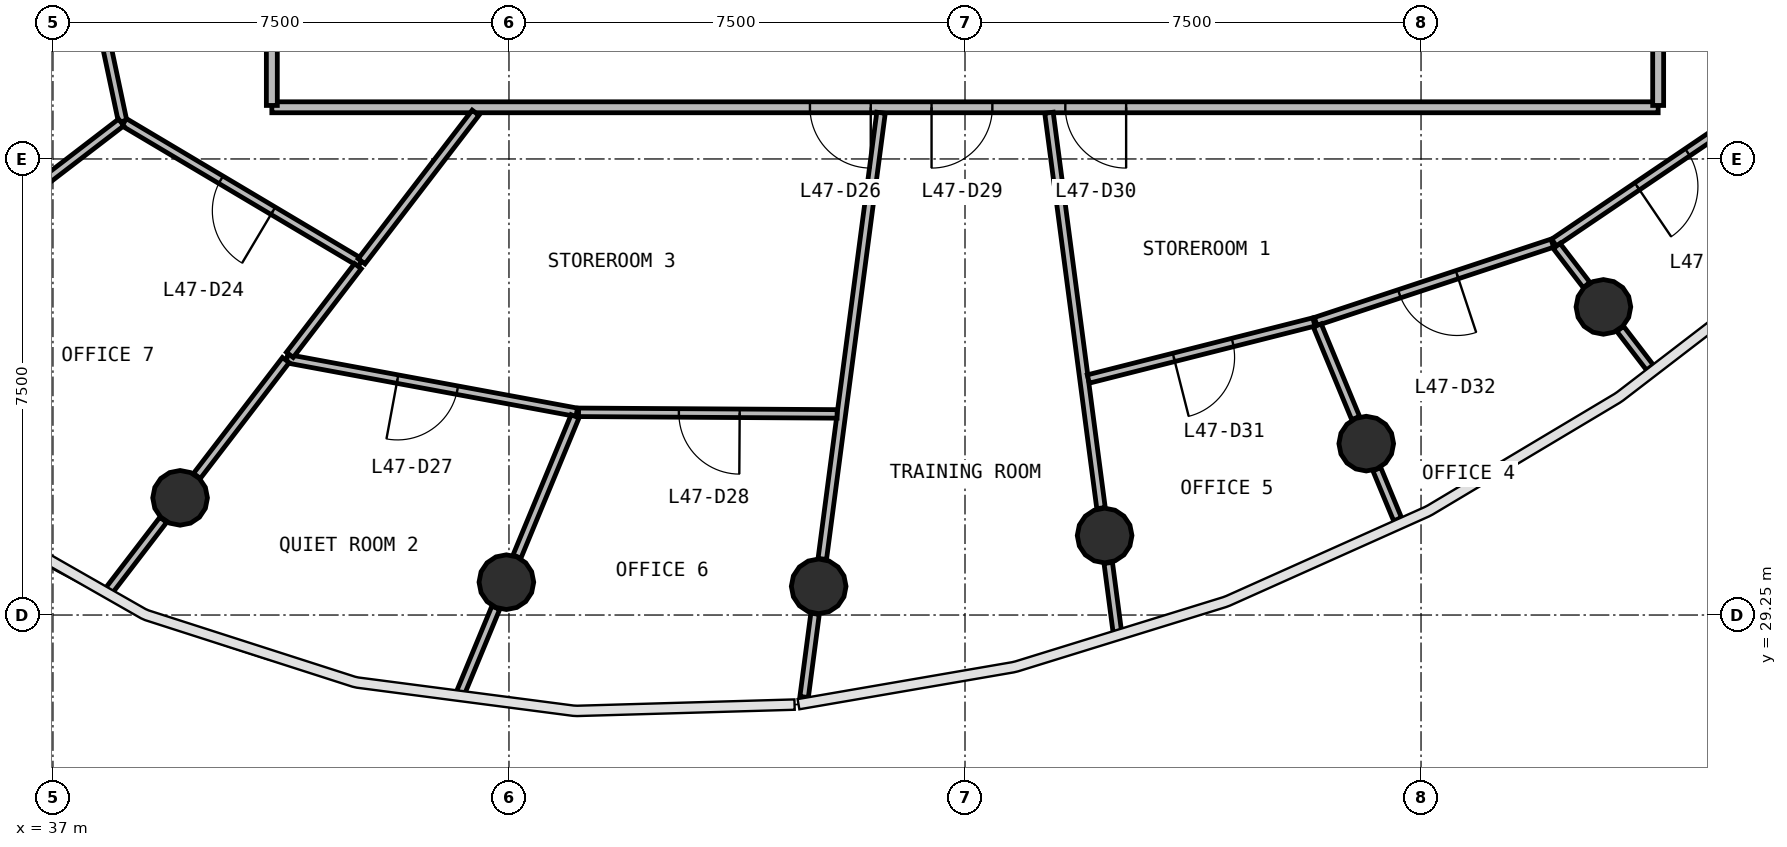
"""IFC4 building model, lengths in metres.
Left out: names, types, materials, properties, quantities, classifications, styles, units other than length and angle.
Written with IfcOpenShell. Run it as: python <this file> out.ifc"""

import sys

from ifc_helpers import new_model, si_unit, direction, frame, frame_2d, origin, origin_2d, place, context, subcontext, project, spatial, rectangle, circle, extrude, source, transform, mapped, element, fill, save


model = new_model("IFC4")
c1 = context("Model", 3, precision=1e-05, world=origin(), true_north=direction((0.0, 1.0)))
c2 = subcontext(c1, "Body", "Model", "MODEL_VIEW")
j1 = project(units=[si_unit("LENGTHUNIT", "METRE"), si_unit("PLANEANGLEUNIT", "RADIAN")], contexts=[c1])
p1 = place(None, origin())
s1 = spatial("IfcSite", under=j1, at=p1, CompositionType="ELEMENT")
p2 = place(p1, origin())
s2 = spatial("IfcBuilding", under=s1, at=p2, CompositionType="ELEMENT")
p3 = place(p2, frame((0.0, 0.0, 195.5)))
s3 = spatial("IfcBuildingStorey", under=s2, at=p3, CompositionType="ELEMENT", Elevation=195.5)
m1 = source(origin(), c2, "Body", "SweptSolid", [
    extrude(circle(Radius=0.45, at=origin_2d()), origin(), (0.0, 0.0, 1.0), 3.9),
])
for number, where, z_axis, x_axis in (
    (1, (39.091, 31.177, 0.0), (0.0, 0.0, 1.0), (1.0, 0.0, 0.0)),
    (2, (44.457, 29.79, 0.0), (0.0, 0.0, 1.0), (1.0, 0.0, 0.0)),
    (3, (49.594, 29.722, 0.0), (0.0, 0.0, 1.0), (1.0, 0.0, 0.0)),
    (4, (54.296, 30.558, 0.0), (0.0, 0.0, 1.0), (1.0, 0.0, 0.0)),
    (5, (58.599, 32.069, 0.0), (0.0, 0.0, 1.0), (1.0, 0.0, 0.0)),
    (6, (62.499, 34.317, 0.0), (0.0, 0.0, 1.0), (1.0, 0.0, 0.0)),
):
    element("IfcColumn", number, at=place(p3, frame(where, z_axis=z_axis, x_axis=x_axis)), inside=s3, PredefinedType="COLUMN", context=c2, shape_type="MappedRepresentation", body=[
        mapped(m1, transform((0.0, 0.0, 0.0), scale=1.0)),
    ])
p4 = place(p3, frame((63.4, 37.6, 0.0), z_axis=(0.0, 0.0, 1.0), x_axis=(-1.0, 0.0, 0.0)))
e7 = element("IfcWall", 7, at=p4, inside=s3, PredefinedType="PARTITIONING", context=c2, shape_type="SweptSolid", body=[
    extrude(rectangle(XDim=22.8, YDim=0.18, at=frame_2d((11.4, 0.0))), origin(), (0.0, 0.0, 1.0), 2.88),
])
p5 = place(p4, frame((12.95, 0.0, 0.0)))
e8 = element("IfcOpeningElement", 8, at=p5, cuts=e7, PredefinedType="OPENING", context=c2, shape_type="SweptSolid", body=[
    extrude(rectangle(XDim=1.0, YDim=2.1, at=frame_2d((0.5, 1.05))), frame((0.0, 0.1, 0.0), z_axis=(0.0, -1.0, 0.0), x_axis=(1.0, 0.0, 0.0)), (0.0, 0.0, 1.0), 0.2),
])
p6 = place(p4, frame((10.95, 0.0, 0.0)))
e9 = element("IfcOpeningElement", 9, at=p6, cuts=e7, PredefinedType="OPENING", context=c2, shape_type="SweptSolid", body=[
    extrude(rectangle(XDim=1.0, YDim=2.1, at=frame_2d((0.5, 1.05))), frame((0.0, 0.1, 0.0), z_axis=(0.0, -1.0, 0.0), x_axis=(1.0, 0.0, 0.0)), (0.0, 0.0, 1.0), 0.2),
])
p7 = place(p4, frame((8.75, 0.0, 0.0)))
e10 = element("IfcOpeningElement", 10, at=p7, cuts=e7, PredefinedType="OPENING", context=c2, shape_type="SweptSolid", body=[
    extrude(rectangle(XDim=1.0, YDim=2.1, at=frame_2d((0.5, 1.05))), frame((0.0, 0.1, 0.0), z_axis=(0.0, -1.0, 0.0), x_axis=(1.0, 0.0, 0.0)), (0.0, 0.0, 1.0), 0.2),
])
p8 = place(p3, frame((63.4, 58.37, 0.0), z_axis=(0.0, 0.0, 1.0), x_axis=(0.0, -1.0, 0.0)))
e11 = element("IfcWall", 11, at=p8, inside=s3, PredefinedType="PARTITIONING", context=c2, shape_type="SweptSolid", body=[
    extrude(rectangle(XDim=20.74, YDim=0.18, at=frame_2d((10.37, 0.0))), origin(), (0.0, 0.0, 1.0), 2.88),
])
p9 = place(p8, frame((9.89, 0.0, 0.0)))
e12 = element("IfcOpeningElement", 12, at=p9, cuts=e11, PredefinedType="OPENING", context=c2, shape_type="SweptSolid", body=[
    extrude(rectangle(XDim=1.0, YDim=2.1, at=frame_2d((0.5, 1.05))), frame((0.0, 0.1, 0.0), z_axis=(0.0, -1.0, 0.0), x_axis=(1.0, 0.0, 0.0)), (0.0, 0.0, 1.0), 0.2),
])
p10 = place(p3, frame((40.6, 37.63, 0.0), z_axis=(0.0, 0.0, 1.0), x_axis=(0.0, 1.0, 0.0)))
e13 = element("IfcWall", 13, at=p10, inside=s3, PredefinedType="PARTITIONING", context=c2, shape_type="SweptSolid", body=[
    extrude(rectangle(XDim=20.74, YDim=0.18, at=frame_2d((10.37, 0.0))), origin(), (0.0, 0.0, 1.0), 2.88),
])
p11 = place(p10, frame((12.19, 0.0, 0.0)))
e14 = element("IfcOpeningElement", 14, at=p11, cuts=e13, PredefinedType="OPENING", context=c2, shape_type="SweptSolid", body=[
    extrude(rectangle(XDim=0.9, YDim=2.1, at=frame_2d((0.45, 1.05))), frame((0.0, 0.1, 0.0), z_axis=(0.0, -1.0, 0.0), x_axis=(1.0, 0.0, 0.0)), (0.0, 0.0, 1.0), 0.2),
])
p12 = place(p10, frame((9.99, 0.0, 0.0)))
e15 = element("IfcOpeningElement", 15, at=p12, cuts=e13, PredefinedType="OPENING", context=c2, shape_type="SweptSolid", body=[
    extrude(rectangle(XDim=0.9, YDim=2.1, at=frame_2d((0.45, 1.05))), frame((0.0, 0.1, 0.0), z_axis=(0.0, -1.0, 0.0), x_axis=(1.0, 0.0, 0.0)), (0.0, 0.0, 1.0), 0.2),
])
p13 = place(p10, frame((7.69, 0.0, 0.0)))
e16 = element("IfcOpeningElement", 16, at=p13, cuts=e13, PredefinedType="OPENING", context=c2, shape_type="SweptSolid", body=[
    extrude(rectangle(XDim=1.0, YDim=2.1, at=frame_2d((0.5, 1.05))), frame((0.0, 0.1, 0.0), z_axis=(0.0, -1.0, 0.0), x_axis=(1.0, 0.0, 0.0)), (0.0, 0.0, 1.0), 0.2),
])
p14 = place(p10, frame((15.49, 0.0, 0.0)))
e17 = element("IfcOpeningElement", 17, at=p14, cuts=e13, PredefinedType="OPENING", context=c2, shape_type="SweptSolid", body=[
    extrude(rectangle(XDim=1.0, YDim=2.1, at=frame_2d((0.5, 1.05))), frame((0.0, 0.1, 0.0), z_axis=(0.0, -1.0, 0.0), x_axis=(1.0, 0.0, 0.0)), (0.0, 0.0, 1.0), 0.2),
])
p15 = place(p3, frame((49.653, 30.172, 0.0), z_axis=(0.0, 0.0, 1.0), x_axis=(0.130532164535, 0.991444075085, 0.0)))
e18 = element("IfcWall", 18, at=p15, inside=s3, PredefinedType="PARTITIONING", context=c2, shape_type="SweptSolid", body=[
    extrude(rectangle(XDim=7.401, YDim=0.14, at=frame_2d((3.7, 0.0))), origin(), (0.0, 0.0, 1.0), 2.88),
])
p16 = place(p3, frame((53.381, 37.51, 0.0), z_axis=(0.0, 0.0, 1.0), x_axis=(0.130519996386, -0.991445677051, 0.0)))
e19 = element("IfcWall", 19, at=p16, inside=s3, PredefinedType="PARTITIONING", context=c2, shape_type="SweptSolid", body=[
    extrude(rectangle(XDim=6.558, YDim=0.14, at=frame_2d((3.279, 0.0))), origin(), (0.0, 0.0, 1.0), 2.88),
])
p17 = place(p3, frame((45.615, 32.584, 0.0), z_axis=(0.0, 0.0, 1.0), x_axis=(-0.983287014194, 0.182062208375, 0.0)))
e20 = element("IfcWall", 20, at=p17, inside=s3, PredefinedType="PARTITIONING", context=c2, shape_type="SweptSolid", body=[
    extrude(rectangle(XDim=4.848, YDim=0.14, at=frame_2d((2.424, 0.0))), origin(), (0.0, 0.0, 1.0), 2.88),
])
p18 = place(p17, frame((1.997, 0.0, 0.0)))
e21 = element("IfcOpeningElement", 21, at=p18, cuts=e20, PredefinedType="OPENING", context=c2, shape_type="SweptSolid", body=[
    extrude(rectangle(XDim=1.0, YDim=2.1, at=frame_2d((0.5, 1.05))), frame((0.0, 0.08, 0.0), z_axis=(0.0, -1.0, 0.0), x_axis=(1.0, 0.0, 0.0)), (0.0, 0.0, 1.0), 0.16),
])
p19 = place(p3, frame((38.146, 37.369, 0.0), z_axis=(0.0, 0.0, 1.0), x_axis=(-0.207067802177, 0.978326594396, 0.0)))
e22 = element("IfcWall", 22, at=p19, inside=s3, PredefinedType="PARTITIONING", context=c2, shape_type="SweptSolid", body=[
    extrude(rectangle(XDim=4.526, YDim=0.14, at=frame_2d((2.263, 0.0))), origin(), (0.0, 0.0, 1.0), 2.88),
])
p20 = place(p19, frame((1.676, 0.0, 0.0)))
e23 = element("IfcOpeningElement", 23, at=p20, cuts=e22, PredefinedType="OPENING", context=c2, shape_type="SweptSolid", body=[
    extrude(rectangle(XDim=1.0, YDim=2.1, at=frame_2d((0.5, 1.05))), frame((0.0, 0.08, 0.0), z_axis=(0.0, -1.0, 0.0), x_axis=(1.0, 0.0, 0.0)), (0.0, 0.0, 1.0), 0.16),
])
p21 = place(p3, frame((42.058, 35.043, 0.0), z_axis=(0.0, 0.0, 1.0), x_axis=(-0.859530118144, 0.511085096635, 0.0)))
e24 = element("IfcWall", 24, at=p21, inside=s3, PredefinedType="PARTITIONING", context=c2, shape_type="SweptSolid", body=[
    extrude(rectangle(XDim=4.521, YDim=0.14, at=frame_2d((2.261, 0.0))), origin(), (0.0, 0.0, 1.0), 2.88),
])
p22 = place(p21, frame((1.671, 0.0, 0.0)))
e25 = element("IfcOpeningElement", 25, at=p22, cuts=e24, PredefinedType="OPENING", context=c2, shape_type="SweptSolid", body=[
    extrude(rectangle(XDim=1.0, YDim=2.1, at=frame_2d((0.5, 1.05))), frame((0.0, 0.08, 0.0), z_axis=(0.0, -1.0, 0.0), x_axis=(1.0, 0.0, 0.0)), (0.0, 0.0, 1.0), 0.16),
])
p23 = place(p3, frame((38.122, 37.351, 0.0), z_axis=(0.0, 0.0, 1.0), x_axis=(-0.793350839002, -0.608764688738, 0.0)))
e26 = element("IfcWall", 26, at=p23, inside=s3, PredefinedType="PARTITIONING", context=c2, shape_type="SweptSolid", body=[
    extrude(rectangle(XDim=4.492, YDim=0.14, at=frame_2d((2.246, 0.0))), origin(), (0.0, 0.0, 1.0), 2.88),
])
p24 = place(p3, frame((49.896, 32.558, 0.0), z_axis=(0.0, 0.0, 1.0), x_axis=(-0.999981480768, 0.006085895215, 0.0)))
e27 = element("IfcWall", 27, at=p24, inside=s3, PredefinedType="PARTITIONING", context=c2, shape_type="SweptSolid", body=[
    extrude(rectangle(XDim=4.252, YDim=0.14, at=frame_2d((2.126, 0.0))), origin(), (0.0, 0.0, 1.0), 2.88),
])
p25 = place(p24, frame((1.602, 0.0, 0.0)))
e28 = element("IfcOpeningElement", 28, at=p25, cuts=e27, PredefinedType="OPENING", context=c2, shape_type="SweptSolid", body=[
    extrude(rectangle(XDim=1.0, YDim=2.1, at=frame_2d((0.5, 1.05))), frame((0.0, 0.08, 0.0), z_axis=(0.0, -1.0, 0.0), x_axis=(1.0, 0.0, 0.0)), (0.0, 0.0, 1.0), 0.16),
])
p26 = place(p3, frame((65.283, 37.808, 0.0), z_axis=(0.0, 0.0, 1.0), x_axis=(-0.828127545773, -0.560539711288, 0.0)))
e29 = element("IfcWall", 29, at=p26, inside=s3, PredefinedType="PARTITIONING", context=c2, shape_type="SweptSolid", body=[
    extrude(rectangle(XDim=4.341, YDim=0.14, at=frame_2d((2.17, 0.0))), origin(), (0.0, 0.0, 1.0), 2.88),
])
p27 = place(p26, frame((1.691, 0.0, 0.0)))
e30 = element("IfcOpeningElement", 30, at=p27, cuts=e29, PredefinedType="OPENING", context=c2, shape_type="SweptSolid", body=[
    extrude(rectangle(XDim=1.0, YDim=2.1, at=frame_2d((0.5, 1.05))), frame((0.0, 0.08, 0.0), z_axis=(0.0, -1.0, 0.0), x_axis=(1.0, 0.0, 0.0)), (0.0, 0.0, 1.0), 0.16),
])
p28 = place(p3, frame((61.659, 35.365, 0.0), z_axis=(0.0, 0.0, 1.0), x_axis=(-0.949342227839, -0.314244068267, 0.0)))
e31 = element("IfcWall", 31, at=p28, inside=s3, PredefinedType="PARTITIONING", context=c2, shape_type="SweptSolid", body=[
    extrude(rectangle(XDim=4.1, YDim=0.14, at=frame_2d((2.05, 0.0))), origin(), (0.0, 0.0, 1.0), 2.88),
])
p29 = place(p28, frame((1.65, 0.0, 0.0)))
e32 = element("IfcOpeningElement", 32, at=p29, cuts=e31, PredefinedType="OPENING", context=c2, shape_type="SweptSolid", body=[
    extrude(rectangle(XDim=1.0, YDim=2.1, at=frame_2d((0.5, 1.05))), frame((0.0, 0.08, 0.0), z_axis=(0.0, -1.0, 0.0), x_axis=(1.0, 0.0, 0.0)), (0.0, 0.0, 1.0), 0.16),
])
p30 = place(p3, frame((57.738, 34.07, 0.0), z_axis=(0.0, 0.0, 1.0), x_axis=(-0.969463236933, -0.245236686152, 0.0)))
e33 = element("IfcWall", 33, at=p30, inside=s3, PredefinedType="PARTITIONING", context=c2, shape_type="SweptSolid", body=[
    extrude(rectangle(XDim=3.827, YDim=0.14, at=frame_2d((1.914, 0.0))), origin(), (0.0, 0.0, 1.0), 2.88),
])
p31 = place(p30, frame((1.377, 0.0, 0.0)))
e34 = element("IfcOpeningElement", 34, at=p31, cuts=e33, PredefinedType="OPENING", context=c2, shape_type="SweptSolid", body=[
    extrude(rectangle(XDim=1.0, YDim=2.1, at=frame_2d((0.5, 1.05))), frame((0.0, 0.08, 0.0), z_axis=(0.0, -1.0, 0.0), x_axis=(1.0, 0.0, 0.0)), (0.0, 0.0, 1.0), 0.16),
])
p32 = place(p3, frame((43.951, 37.51, 0.0), z_axis=(0.0, 0.0, 1.0), x_axis=(-0.608729433535, -0.793377890256, 0.0)))
e35 = element("IfcWall", 35, at=p32, inside=s3, PredefinedType="PARTITIONING", context=c2, shape_type="SweptSolid", body=[
    extrude(rectangle(XDim=3.079, YDim=0.14, at=frame_2d((1.54, 0.0))), origin(), (0.0, 0.0, 1.0), 2.88),
])
p33 = place(p3, frame((45.587, 32.518, 0.0), z_axis=(0.0, 0.0, 1.0), x_axis=(-0.382691448247, -0.923876212184, 0.0)))
e36 = element("IfcWall", 36, at=p33, inside=s3, PredefinedType="PARTITIONING", context=c2, shape_type="SweptSolid", body=[
    extrude(rectangle(XDim=2.497, YDim=0.14, at=frame_2d((1.249, 0.0))), origin(), (0.0, 0.0, 1.0), 2.88),
])
p34 = place(p3, frame((40.83, 33.443, 0.0), z_axis=(0.0, 0.0, 1.0), x_axis=(-0.608796464689, -0.793326455239, 0.0)))
e37 = element("IfcWall", 37, at=p34, inside=s3, PredefinedType="PARTITIONING", context=c2, shape_type="SweptSolid", body=[
    extrude(rectangle(XDim=2.401, YDim=0.14, at=frame_2d((1.201, 0.0))), origin(), (0.0, 0.0, 1.0), 2.88),
])
p35 = place(p3, frame((42.015, 34.987, 0.0), z_axis=(0.0, 0.0, 1.0), x_axis=(-0.608760473936, -0.793354073144, 0.0)))
e38 = element("IfcWall", 38, at=p35, inside=s3, PredefinedType="PARTITIONING", context=c2, shape_type="SweptSolid", body=[
    extrude(rectangle(XDim=1.838, YDim=0.14, at=frame_2d((0.919, 0.0))), origin(), (0.0, 0.0, 1.0), 2.88),
])
p36 = place(p3, frame((57.794, 34.012, 0.0), z_axis=(0.0, 0.0, 1.0), x_axis=(0.382648241093, -0.923894108428, 0.0)))
e39 = element("IfcWall", 39, at=p36, inside=s3, PredefinedType="PARTITIONING", context=c2, shape_type="SweptSolid", body=[
    extrude(rectangle(XDim=1.649, YDim=0.14, at=frame_2d((0.824, 0.0))), origin(), (0.0, 0.0, 1.0), 2.88),
])
p37 = place(p3, frame((44.283, 29.37, 0.0), z_axis=(0.0, 0.0, 1.0), x_axis=(-0.382783039517, -0.923838267587, 0.0)))
e40 = element("IfcWall", 40, at=p37, inside=s3, PredefinedType="PARTITIONING", context=c2, shape_type="SweptSolid", body=[
    extrude(rectangle(XDim=1.533, YDim=0.14, at=frame_2d((0.767, 0.0))), origin(), (0.0, 0.0, 1.0), 2.88),
])
p38 = place(p3, frame((38.814, 30.816, 0.0), z_axis=(0.0, 0.0, 1.0), x_axis=(-0.608738517345, -0.793370920504, 0.0)))
e41 = element("IfcWall", 41, at=p38, inside=s3, PredefinedType="PARTITIONING", context=c2, shape_type="SweptSolid", body=[
    extrude(rectangle(XDim=1.469, YDim=0.14, at=frame_2d((0.734, 0.0))), origin(), (0.0, 0.0, 1.0), 2.88),
])
p39 = place(p3, frame((49.534, 29.271, 0.0), z_axis=(0.0, 0.0, 1.0), x_axis=(-0.130495678972, -0.991448878041, 0.0)))
e42 = element("IfcWall", 42, at=p39, inside=s3, PredefinedType="PARTITIONING", context=c2, shape_type="SweptSolid", body=[
    extrude(rectangle(XDim=1.381, YDim=0.14, at=frame_2d((0.69, 0.0))), origin(), (0.0, 0.0, 1.0), 2.88),
])
p40 = place(p3, frame((54.356, 30.107, 0.0), z_axis=(0.0, 0.0, 1.0), x_axis=(0.130415862512, -0.99145938031, 0.0)))
e43 = element("IfcWall", 43, at=p40, inside=s3, PredefinedType="PARTITIONING", context=c2, shape_type="SweptSolid", body=[
    extrude(rectangle(XDim=1.144, YDim=0.14, at=frame_2d((0.572, 0.0))), origin(), (0.0, 0.0, 1.0), 2.88),
])
p41 = place(p3, frame((58.773, 31.648, 0.0), z_axis=(0.0, 0.0, 1.0), x_axis=(0.382609993492, -0.923909948469, 0.0)))
e44 = element("IfcWall", 44, at=p41, inside=s3, PredefinedType="PARTITIONING", context=c2, shape_type="SweptSolid", body=[
    extrude(rectangle(XDim=0.891, YDim=0.14, at=frame_2d((0.445, 0.0))), origin(), (0.0, 0.0, 1.0), 2.88),
])
p42 = place(p3, frame((61.73, 35.319, 0.0), z_axis=(0.0, 0.0, 1.0), x_axis=(0.608659697441, -0.793431391307, 0.0)))
e45 = element("IfcWall", 45, at=p42, inside=s3, PredefinedType="PARTITIONING", context=c2, shape_type="SweptSolid", body=[
    extrude(rectangle(XDim=0.809, YDim=0.14, at=frame_2d((0.404, 0.0))), origin(), (0.0, 0.0, 1.0), 2.88),
])
p43 = place(p3, frame((62.776, 33.956, 0.0), z_axis=(0.0, 0.0, 1.0), x_axis=(0.608783126566, -0.793336690698, 0.0)))
e46 = element("IfcWall", 46, at=p43, inside=s3, PredefinedType="PARTITIONING", context=c2, shape_type="SweptSolid", body=[
    extrude(rectangle(XDim=0.802, YDim=0.14, at=frame_2d((0.401, 0.0))), origin(), (0.0, 0.0, 1.0), 2.88),
])
m2 = source(origin(), c2, "Body", "SweptSolid", [
    extrude(rectangle(XDim=1.0, YDim=2.1, at=frame_2d((0.5, 1.05))), frame((0.0, 0.025, 0.0), z_axis=(0.0, -1.0, 0.0), x_axis=(1.0, 0.0, 0.0)), (0.0, 0.0, 1.0), 0.05),
])
p44 = place(p22, origin())
e47 = element("IfcDoor", 47, at=p44, inside=s3, OperationType="SINGLE_SWING_LEFT", PredefinedType="DOOR", context=c2, shape_type="MappedRepresentation", body=[
    mapped(m2, transform((0.0, 0.0, 0.0), scale=1.0)),
])
fill(e25, e47)
p45 = place(p5, origin())
e48 = element("IfcDoor", 48, at=p45, inside=s3, OperationType="SINGLE_SWING_LEFT", PredefinedType="DOOR", context=c2, shape_type="MappedRepresentation", body=[
    mapped(m2, transform((0.0, 0.0, 0.0), scale=1.0)),
])
fill(e8, e48)
p46 = place(p18, origin())
e49 = element("IfcDoor", 49, at=p46, inside=s3, OperationType="SINGLE_SWING_RIGHT", PredefinedType="DOOR", context=c2, shape_type="MappedRepresentation", body=[
    mapped(m2, transform((0.0, 0.0, 0.0), scale=1.0)),
])
fill(e21, e49)
p47 = place(p25, origin())
e50 = element("IfcDoor", 50, at=p47, inside=s3, OperationType="SINGLE_SWING_LEFT", PredefinedType="DOOR", context=c2, shape_type="MappedRepresentation", body=[
    mapped(m2, transform((0.0, 0.0, 0.0), scale=1.0)),
])
fill(e28, e50)
p48 = place(p6, origin())
e51 = element("IfcDoor", 51, at=p48, inside=s3, OperationType="SINGLE_SWING_RIGHT", PredefinedType="DOOR", context=c2, shape_type="MappedRepresentation", body=[
    mapped(m2, transform((0.0, 0.0, 0.0), scale=1.0)),
])
fill(e9, e51)
p49 = place(p7, origin())
e52 = element("IfcDoor", 52, at=p49, inside=s3, OperationType="SINGLE_SWING_LEFT", PredefinedType="DOOR", context=c2, shape_type="MappedRepresentation", body=[
    mapped(m2, transform((0.0, 0.0, 0.0), scale=1.0)),
])
fill(e10, e52)
p50 = place(p31, origin())
e53 = element("IfcDoor", 53, at=p50, inside=s3, OperationType="SINGLE_SWING_RIGHT", PredefinedType="DOOR", context=c2, shape_type="MappedRepresentation", body=[
    mapped(m2, transform((0.0, 0.0, 0.0), scale=1.0)),
])
fill(e34, e53)
p51 = place(p29, origin())
e54 = element("IfcDoor", 54, at=p51, inside=s3, OperationType="SINGLE_SWING_LEFT", PredefinedType="DOOR", context=c2, shape_type="MappedRepresentation", body=[
    mapped(m2, transform((0.0, 0.0, 0.0), scale=1.0)),
])
fill(e32, e54)
p52 = place(p27, origin())
e55 = element("IfcDoor", 55, at=p52, inside=s3, OperationType="SINGLE_SWING_RIGHT", PredefinedType="DOOR", context=c2, shape_type="MappedRepresentation", body=[
    mapped(m2, transform((0.0, 0.0, 0.0), scale=1.0)),
])
fill(e30, e55)
save(model, sys.argv[1])
